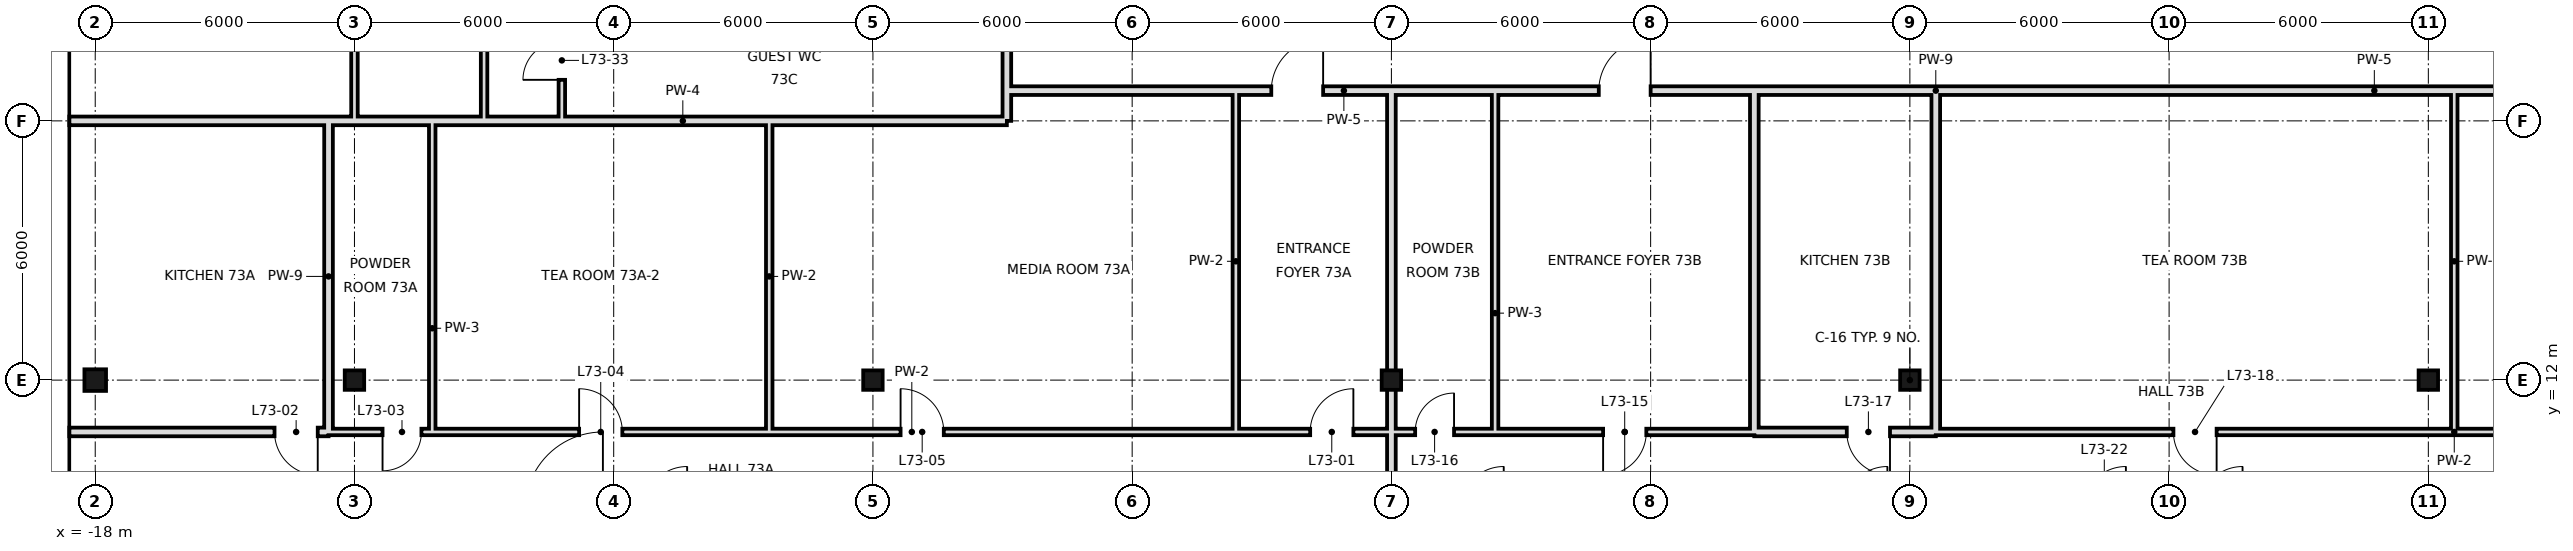
"""IFC4 building model, lengths in metres.
Left out: names, types, materials, properties, quantities, classifications, styles, units other than length and angle.
Written with IfcOpenShell. Run it as: python <this file> out.ifc"""

import sys

from ifc_helpers import new_model, si_unit, direction, frame, frame_2d, origin, origin_2d, place, context, subcontext, project, spatial, rectangle, hollow_rectangle, extrude, element, fill, save


model = new_model("IFC4")
c1 = context("Model", 3, precision=1e-05, world=origin(), true_north=direction((0.0, 1.0)))
c2 = subcontext(c1, "Body", "Model", "MODEL_VIEW")
j1 = project(units=[si_unit("LENGTHUNIT", "METRE"), si_unit("PLANEANGLEUNIT", "RADIAN")], contexts=[c1])
p1 = place(None, origin())
s1 = spatial("IfcSite", under=j1, at=p1, CompositionType="ELEMENT")
p2 = place(p1, origin())
s2 = spatial("IfcBuilding", under=s1, at=p2, CompositionType="ELEMENT")
p3 = place(p2, frame((0.0, 0.0, 308.8)))
s3 = spatial("IfcBuildingStorey", under=s2, at=p3, CompositionType="ELEMENT", Elevation=308.8)
p4 = place(p3, frame((-18.0, 12.0, 0.0), z_axis=(0.0, 0.0, 1.0), x_axis=(1.0, 0.0, 0.0)))
e1 = element("IfcColumn", 1, at=p4, inside=s3, PredefinedType="COLUMN", context=c2, shape_type="SweptSolid", body=[
    extrude(hollow_rectangle(XDim=0.5, YDim=0.5, WallThickness=0.025, at=origin_2d()), origin(), (0.0, 0.0, 1.0), 3.6),
])
for number, where, z_axis, x_axis in (
    (2, (-12.0, 12.0, 0.0), (0.0, 0.0, 1.0), (1.0, 0.0, 0.0)),
    (3, (0.0, 12.0, 0.0), (0.0, 0.0, 1.0), (1.0, 0.0, 0.0)),
    (4, (12.0, 12.0, 0.0), (0.0, 0.0, 1.0), (1.0, 0.0, 0.0)),
    (5, (24.0, 12.0, 0.0), (0.0, 0.0, 1.0), (1.0, 0.0, 0.0)),
    (6, (36.0, 12.0, 0.0), (0.0, 0.0, 1.0), (1.0, 0.0, 0.0)),
):
    element("IfcColumn", number, at=place(p3, frame(where, z_axis=z_axis, x_axis=x_axis)), inside=s3, PredefinedType="COLUMN", context=c2, shape_type="SweptSolid", body=[
        extrude(hollow_rectangle(XDim=0.45, YDim=0.45, WallThickness=0.022, at=origin_2d()), origin(), (0.0, 0.0, 1.0), 3.6),
    ])
p5 = place(p3, frame((-10.2, 10.8, 0.0), z_axis=(0.0, 0.0, 1.0), x_axis=(0.0, 1.0, 0.0)))
e7 = element("IfcWall", 7, at=p5, inside=s3, PredefinedType="PARTITIONING", context=c2, shape_type="SweptSolid", body=[
    extrude(rectangle(XDim=7.2, YDim=0.15, at=frame_2d((3.6, 0.0))), origin(), (0.0, 0.0, 1.0), 3.42),
])
p6 = place(p3, frame((-12.0, 18.0, 0.0), z_axis=(0.0, 0.0, 1.0), x_axis=(0.0, 1.0, 0.0)))
e8 = element("IfcWall", 8, at=p6, inside=s3, PredefinedType="PARTITIONING", context=c2, shape_type="SweptSolid", body=[
    extrude(rectangle(XDim=12.0, YDim=0.15, at=frame_2d((6.0, 0.0))), origin(), (0.0, 0.0, 1.0), 2.72),
])
p7 = place(p6, frame((3.16, 0.0, 0.0)))
e9 = element("IfcOpeningElement", 9, at=p7, cuts=e8, PredefinedType="OPENING", context=c2, shape_type="SweptSolid", body=[
    extrude(rectangle(XDim=1.8, YDim=2.4, at=frame_2d((0.9, 1.2))), frame((0.0, 0.085, 0.0), z_axis=(0.0, -1.0, 0.0), x_axis=(1.0, 0.0, 0.0)), (0.0, 0.0, 1.0), 0.17),
])
p8 = place(p3, frame((-12.6, 10.8, 0.0), z_axis=(0.0, 0.0, 1.0), x_axis=(0.0, 1.0, 0.0)))
e10 = element("IfcWall", 10, at=p8, inside=s3, PredefinedType="SOLIDWALL", context=c2, shape_type="SweptSolid", body=[
    extrude(rectangle(XDim=7.2, YDim=0.2, at=frame_2d((3.6, 0.0))), origin(), (0.0, 0.0, 1.0), 2.97),
])
p9 = place(p3, frame((-2.4, 10.8, 0.0), z_axis=(0.0, 0.0, 1.0), x_axis=(0.0, 1.0, 0.0)))
e11 = element("IfcWall", 11, at=p9, inside=s3, PredefinedType="PARTITIONING", context=c2, shape_type="SweptSolid", body=[
    extrude(rectangle(XDim=7.2, YDim=0.15, at=frame_2d((3.6, 0.0))), origin(), (0.0, 0.0, 1.0), 3.42),
])
p10 = place(p3, frame((-7.2, 18.0, 0.0), z_axis=(0.0, 0.0, 1.0), x_axis=(0.0, 1.0, 0.0)))
e12 = element("IfcWall", 12, at=p10, inside=s3, PredefinedType="PARTITIONING", context=c2, shape_type="SweptSolid", body=[
    extrude(rectangle(XDim=2.4, YDim=0.15, at=frame_2d((1.2, 0.0))), origin(), (0.0, 0.0, 1.0), 3.42),
])
p11 = place(p10, frame((0.95, 0.0, 0.0)))
e13 = element("IfcOpeningElement", 13, at=p11, cuts=e12, PredefinedType="OPENING", context=c2, shape_type="SweptSolid", body=[
    extrude(rectangle(XDim=0.9, YDim=2.4, at=frame_2d((0.45, 1.2))), frame((0.0, 0.085, 0.0), z_axis=(0.0, -1.0, 0.0), x_axis=(1.0, 0.0, 0.0)), (0.0, 0.0, 1.0), 0.17),
])
p12 = place(p3, frame((-9.0, 18.0, 0.0), z_axis=(0.0, 0.0, 1.0), x_axis=(0.0, 1.0, 0.0)))
e14 = element("IfcWall", 14, at=p12, inside=s3, PredefinedType="PARTITIONING", context=c2, shape_type="SweptSolid", body=[
    extrude(rectangle(XDim=18.0, YDim=0.15, at=frame_2d((9.0, 0.0))), origin(), (0.0, 0.0, 1.0), 3.42),
])
p13 = place(p12, frame((3.16, 0.0, 0.0)))
e15 = element("IfcOpeningElement", 15, at=p13, cuts=e14, PredefinedType="OPENING", context=c2, shape_type="SweptSolid", body=[
    extrude(rectangle(XDim=1.8, YDim=2.4, at=frame_2d((0.9, 1.2))), frame((0.0, 0.085, 0.0), z_axis=(0.0, -1.0, 0.0), x_axis=(1.0, 0.0, 0.0)), (0.0, 0.0, 1.0), 0.17),
])
p14 = place(p12, frame((13.6, 0.0, 0.0)))
e16 = element("IfcOpeningElement", 16, at=p14, cuts=e14, PredefinedType="OPENING", context=c2, shape_type="SweptSolid", body=[
    extrude(rectangle(XDim=1.0, YDim=2.4, at=frame_2d((0.5, 1.2))), frame((0.0, 0.085, 0.0), z_axis=(0.0, -1.0, 0.0), x_axis=(1.0, 0.0, 0.0)), (0.0, 0.0, 1.0), 0.17),
])
p15 = place(p3, frame((12.0, 0.0, 0.0), z_axis=(0.0, 0.0, 1.0), x_axis=(0.0, 1.0, 0.0)))
e17 = element("IfcWall", 17, at=p15, inside=s3, PredefinedType="SOLIDWALL", context=c2, shape_type="SweptSolid", body=[
    extrude(rectangle(XDim=18.7, YDim=0.2, at=frame_2d((9.35, 0.0))), origin(), (0.0, 0.0, 1.0), 2.72),
])
p16 = place(p3, frame((14.4, 10.8, 0.0), z_axis=(0.0, 0.0, 1.0), x_axis=(0.0, 1.0, 0.0)))
e18 = element("IfcWall", 18, at=p16, inside=s3, PredefinedType="PARTITIONING", context=c2, shape_type="SweptSolid", body=[
    extrude(rectangle(XDim=7.9, YDim=0.15, at=frame_2d((3.95, 0.0))), origin(), (0.0, 0.0, 1.0), 3.42),
])
for number, where, z_axis, x_axis in (
    (19, (20.4, 10.8, 0.0), (0.0, 0.0, 1.0), (0.0, 1.0, 0.0)),
    (20, (24.6, 10.8, 0.0), (0.0, 0.0, 1.0), (0.0, 1.0, 0.0)),
):
    element("IfcWall", number, at=place(p3, frame(where, z_axis=z_axis, x_axis=x_axis)), inside=s3, PredefinedType="SOLIDWALL", context=c2, shape_type="SweptSolid", body=[
        extrude(rectangle(XDim=7.9, YDim=0.2, at=frame_2d((3.95, 0.0))), origin(), (0.0, 0.0, 1.0), 2.72),
    ])
p17 = place(p3, frame((3.1, 18.7, 0.0), z_axis=(0.0, 0.0, 1.0), x_axis=(0.0, 1.0, 0.0)))
e21 = element("IfcWall", 21, at=p17, inside=s3, PredefinedType="SOLIDWALL", context=c2, shape_type="SweptSolid", body=[
    extrude(rectangle(XDim=1.7, YDim=0.2, at=frame_2d((0.85, 0.0))), origin(), (0.0, 0.0, 1.0), 3.42),
])
p18 = place(p3, frame((3.1, 18.0, 0.0), z_axis=(0.0, 0.0, 1.0), x_axis=(0.0, 1.0, 0.0)))
e22 = element("IfcWall", 22, at=p18, inside=s3, PredefinedType="SOLIDWALL", context=c2, shape_type="SweptSolid", body=[
    extrude(rectangle(XDim=0.7, YDim=0.2, at=frame_2d((0.35, 0.0))), origin(), (0.0, 0.0, 1.0), 2.97),
])
for number, where, z_axis, x_axis in (
    (23, (36.6, 10.8, 0.0), (0.0, 0.0, 1.0), (0.0, 1.0, 0.0)),
    (24, (8.4, 10.8, 0.0), (0.0, 0.0, 1.0), (0.0, 1.0, 0.0)),
):
    element("IfcWall", number, at=place(p3, frame(where, z_axis=z_axis, x_axis=x_axis)), inside=s3, PredefinedType="PARTITIONING", context=c2, shape_type="SweptSolid", body=[
        extrude(rectangle(XDim=7.9, YDim=0.15, at=frame_2d((3.95, 0.0))), origin(), (0.0, 0.0, 1.0), 3.42),
    ])
p19 = place(p3, frame((-18.6, 10.8, 0.0), z_axis=(0.0, 0.0, 1.0), x_axis=(1.0, 0.0, 0.0)))
e25 = element("IfcWall", 25, at=p19, inside=s3, PredefinedType="SOLIDWALL", context=c2, shape_type="SweptSolid", body=[
    extrude(rectangle(XDim=6.0, YDim=0.2, at=frame_2d((3.0, 0.0))), origin(), (0.0, 0.0, 1.0), 2.97),
])
p20 = place(p19, frame((4.75, 0.0, 0.0)))
e26 = element("IfcOpeningElement", 26, at=p20, cuts=e25, PredefinedType="OPENING", context=c2, shape_type="SweptSolid", body=[
    extrude(rectangle(XDim=1.0, YDim=2.4, at=frame_2d((0.5, 1.2))), frame((0.0, 0.11, 0.0), z_axis=(0.0, -1.0, 0.0), x_axis=(1.0, 0.0, 0.0)), (0.0, 0.0, 1.0), 0.22),
])
p21 = place(p3, frame((20.4, 10.8, 0.0), z_axis=(0.0, 0.0, 1.0), x_axis=(1.0, 0.0, 0.0)))
e27 = element("IfcWall", 27, at=p21, inside=s3, PredefinedType="SOLIDWALL", context=c2, shape_type="SweptSolid", body=[
    extrude(rectangle(XDim=4.2, YDim=0.2, at=frame_2d((2.1, 0.0))), origin(), (0.0, 0.0, 1.0), 2.72),
])
p22 = place(p21, frame((2.14, 0.0, 0.0)))
e28 = element("IfcOpeningElement", 28, at=p22, cuts=e27, PredefinedType="OPENING", context=c2, shape_type="SweptSolid", body=[
    extrude(rectangle(XDim=1.0, YDim=2.4, at=frame_2d((0.5, 1.2))), frame((0.0, 0.11, 0.0), z_axis=(0.0, -1.0, 0.0), x_axis=(1.0, 0.0, 0.0)), (0.0, 0.0, 1.0), 0.22),
])
p23 = place(p3, frame((-10.2, 10.8, 0.0), z_axis=(0.0, 0.0, 1.0), x_axis=(1.0, 0.0, 0.0)))
e29 = element("IfcWall", 29, at=p23, inside=s3, PredefinedType="PARTITIONING", context=c2, shape_type="SweptSolid", body=[
    extrude(rectangle(XDim=22.2, YDim=0.15, at=frame_2d((11.1, 0.0))), origin(), (0.0, 0.0, 1.0), 3.42),
])
p24 = place(p23, frame((20.32, 0.0, 0.0)))
e30 = element("IfcOpeningElement", 30, at=p24, cuts=e29, PredefinedType="OPENING", context=c2, shape_type="SweptSolid", body=[
    extrude(rectangle(XDim=1.0, YDim=2.4, at=frame_2d((0.5, 1.2))), frame((0.0, 0.085, 0.0), z_axis=(0.0, -1.0, 0.0), x_axis=(1.0, 0.0, 0.0)), (0.0, 0.0, 1.0), 0.17),
])
p25 = place(p23, frame((3.4, 0.0, 0.0)))
e31 = element("IfcOpeningElement", 31, at=p25, cuts=e29, PredefinedType="OPENING", context=c2, shape_type="SweptSolid", body=[
    extrude(rectangle(XDim=1.0, YDim=2.4, at=frame_2d((0.5, 1.2))), frame((0.0, 0.085, 0.0), z_axis=(0.0, -1.0, 0.0), x_axis=(1.0, 0.0, 0.0)), (0.0, 0.0, 1.0), 0.17),
])
p26 = place(p23, frame((10.84, 0.0, 0.0)))
e32 = element("IfcOpeningElement", 32, at=p26, cuts=e29, PredefinedType="OPENING", context=c2, shape_type="SweptSolid", body=[
    extrude(rectangle(XDim=1.0, YDim=2.4, at=frame_2d((0.5, 1.2))), frame((0.0, 0.085, 0.0), z_axis=(0.0, -1.0, 0.0), x_axis=(1.0, 0.0, 0.0)), (0.0, 0.0, 1.0), 0.17),
])
p27 = place(p3, frame((14.4, 10.8, 0.0), z_axis=(0.0, 0.0, 1.0), x_axis=(1.0, 0.0, 0.0)))
e33 = element("IfcWall", 33, at=p27, inside=s3, PredefinedType="PARTITIONING", context=c2, shape_type="SweptSolid", body=[
    extrude(rectangle(XDim=6.0, YDim=0.15, at=frame_2d((3.0, 0.0))), origin(), (0.0, 0.0, 1.0), 3.42),
])
p28 = place(p27, frame((2.5, 0.0, 0.0)))
e34 = element("IfcOpeningElement", 34, at=p28, cuts=e33, PredefinedType="OPENING", context=c2, shape_type="SweptSolid", body=[
    extrude(rectangle(XDim=1.0, YDim=2.4, at=frame_2d((0.5, 1.2))), frame((0.0, 0.085, 0.0), z_axis=(0.0, -1.0, 0.0), x_axis=(1.0, 0.0, 0.0)), (0.0, 0.0, 1.0), 0.17),
])
p29 = place(p3, frame((24.6, 10.8, 0.0), z_axis=(0.0, 0.0, 1.0), x_axis=(1.0, 0.0, 0.0)))
e35 = element("IfcWall", 35, at=p29, inside=s3, PredefinedType="PARTITIONING", context=c2, shape_type="SweptSolid", body=[
    extrude(rectangle(XDim=24.0, YDim=0.15, at=frame_2d((12.0, 0.0))), origin(), (0.0, 0.0, 1.0), 3.42),
])
p30 = place(p29, frame((5.5, 0.0, 0.0)))
e36 = element("IfcOpeningElement", 36, at=p30, cuts=e35, PredefinedType="OPENING", context=c2, shape_type="SweptSolid", body=[
    extrude(rectangle(XDim=1.0, YDim=2.4, at=frame_2d((0.5, 1.2))), frame((0.0, 0.085, 0.0), z_axis=(0.0, -1.0, 0.0), x_axis=(1.0, 0.0, 0.0)), (0.0, 0.0, 1.0), 0.17),
])
p31 = place(p29, frame((15.22, 0.0, 0.0)))
e37 = element("IfcOpeningElement", 37, at=p31, cuts=e35, PredefinedType="OPENING", context=c2, shape_type="SweptSolid", body=[
    extrude(rectangle(XDim=1.0, YDim=2.4, at=frame_2d((0.5, 1.2))), frame((0.0, 0.085, 0.0), z_axis=(0.0, -1.0, 0.0), x_axis=(1.0, 0.0, 0.0)), (0.0, 0.0, 1.0), 0.17),
])
p32 = place(p3, frame((-12.6, 10.8, 0.0), z_axis=(0.0, 0.0, 1.0), x_axis=(1.0, 0.0, 0.0)))
e38 = element("IfcWall", 38, at=p32, inside=s3, PredefinedType="PARTITIONING", context=c2, shape_type="SweptSolid", body=[
    extrude(rectangle(XDim=2.4, YDim=0.15, at=frame_2d((1.2, 0.0))), origin(), (0.0, 0.0, 1.0), 3.42),
])
p33 = place(p32, frame((1.25, 0.0, 0.0)))
e39 = element("IfcOpeningElement", 39, at=p33, cuts=e38, PredefinedType="OPENING", context=c2, shape_type="SweptSolid", body=[
    extrude(rectangle(XDim=0.9, YDim=2.4, at=frame_2d((0.45, 1.2))), frame((0.0, 0.085, 0.0), z_axis=(0.0, -1.0, 0.0), x_axis=(1.0, 0.0, 0.0)), (0.0, 0.0, 1.0), 0.17),
])
p34 = place(p3, frame((12.0, 10.8, 0.0), z_axis=(0.0, 0.0, 1.0), x_axis=(1.0, 0.0, 0.0)))
e40 = element("IfcWall", 40, at=p34, inside=s3, PredefinedType="PARTITIONING", context=c2, shape_type="SweptSolid", body=[
    extrude(rectangle(XDim=2.4, YDim=0.15, at=frame_2d((1.2, 0.0))), origin(), (0.0, 0.0, 1.0), 3.42),
])
p35 = place(p34, frame((0.55, 0.0, 0.0)))
e41 = element("IfcOpeningElement", 41, at=p35, cuts=e40, PredefinedType="OPENING", context=c2, shape_type="SweptSolid", body=[
    extrude(rectangle(XDim=0.9, YDim=2.4, at=frame_2d((0.45, 1.2))), frame((0.0, 0.085, 0.0), z_axis=(0.0, -1.0, 0.0), x_axis=(1.0, 0.0, 0.0)), (0.0, 0.0, 1.0), 0.17),
])
p36 = place(p3, frame((-18.6, 18.0, 0.0), z_axis=(0.0, 0.0, 1.0), x_axis=(1.0, 0.0, 0.0)))
e42 = element("IfcWall", 42, at=p36, inside=s3, PredefinedType="SOLIDWALL", context=c2, shape_type="SweptSolid", body=[
    extrude(rectangle(XDim=6.0, YDim=0.2, at=frame_2d((3.0, 0.0))), origin(), (0.0, 0.0, 1.0), 2.72),
])
p37 = place(p3, frame((-12.6, 18.0, 0.0), z_axis=(0.0, 0.0, 1.0), x_axis=(1.0, 0.0, 0.0)))
e43 = element("IfcWall", 43, at=p37, inside=s3, PredefinedType="SOLIDWALL", context=c2, shape_type="SweptSolid", body=[
    extrude(rectangle(XDim=15.7, YDim=0.2, at=frame_2d((7.85, 0.0))), origin(), (0.0, 0.0, 1.0), 2.72),
])
p38 = place(p3, frame((3.1, 18.7, 0.0), z_axis=(0.0, 0.0, 1.0), x_axis=(1.0, 0.0, 0.0)))
e44 = element("IfcWall", 44, at=p38, inside=s3, PredefinedType="SOLIDWALL", context=c2, shape_type="SweptSolid", body=[
    extrude(rectangle(XDim=17.3, YDim=0.2, at=frame_2d((8.65, 0.0))), origin(), (0.0, 0.0, 1.0), 2.72),
])
p39 = place(p38, frame((6.12, 0.0, 0.0)))
e45 = element("IfcOpeningElement", 45, at=p39, cuts=e44, PredefinedType="OPENING", context=c2, shape_type="SweptSolid", body=[
    extrude(rectangle(XDim=1.2, YDim=2.4, at=frame_2d((0.6, 1.2))), frame((0.0, 0.11, 0.0), z_axis=(0.0, -1.0, 0.0), x_axis=(1.0, 0.0, 0.0)), (0.0, 0.0, 1.0), 0.22),
])
p40 = place(p38, frame((13.7, 0.0, 0.0)))
e46 = element("IfcOpeningElement", 46, at=p40, cuts=e44, PredefinedType="OPENING", context=c2, shape_type="SweptSolid", body=[
    extrude(rectangle(XDim=1.2, YDim=2.4, at=frame_2d((0.6, 1.2))), frame((0.0, 0.11, 0.0), z_axis=(0.0, -1.0, 0.0), x_axis=(1.0, 0.0, 0.0)), (0.0, 0.0, 1.0), 0.22),
])
p41 = place(p3, frame((24.6, 18.7, 0.0), z_axis=(0.0, 0.0, 1.0), x_axis=(1.0, 0.0, 0.0)))
e47 = element("IfcWall", 47, at=p41, inside=s3, PredefinedType="SOLIDWALL", context=c2, shape_type="SweptSolid", body=[
    extrude(rectangle(XDim=20.3, YDim=0.2, at=frame_2d((10.15, 0.0))), origin(), (0.0, 0.0, 1.0), 2.72),
])
p42 = place(p3, frame((20.4, 18.7, 0.0), z_axis=(0.0, 0.0, 1.0), x_axis=(1.0, 0.0, 0.0)))
e48 = element("IfcWall", 48, at=p42, inside=s3, PredefinedType="SOLIDWALL", context=c2, shape_type="SweptSolid", body=[
    extrude(rectangle(XDim=4.2, YDim=0.2, at=frame_2d((2.1, 0.0))), origin(), (0.0, 0.0, 1.0), 3.42),
])
p43 = place(p24, frame((1.0, 0.0, 0.0), z_axis=(0.0, 0.0, 1.0), x_axis=(-1.0, 0.0, 0.0)))
e49 = element("IfcDoor", 49, at=p43, inside=s3, OperationType="SINGLE_SWING_LEFT", PredefinedType="DOOR", context=c2, shape_type="SweptSolid", body=[
    extrude(rectangle(XDim=1.0, YDim=2.4, at=frame_2d((0.5, 1.2))), frame((0.0, 0.025, 0.0), z_axis=(0.0, -1.0, 0.0), x_axis=(1.0, 0.0, 0.0)), (0.0, 0.0, 1.0), 0.05),
])
fill(e30, e49)
p44 = place(p20, origin())
e50 = element("IfcDoor", 50, at=p44, inside=s3, OperationType="SINGLE_SWING_RIGHT", PredefinedType="DOOR", context=c2, shape_type="SweptSolid", body=[
    extrude(rectangle(XDim=1.0, YDim=2.4, at=frame_2d((0.5, 1.2))), frame((0.0, 0.025, 0.0), z_axis=(0.0, -1.0, 0.0), x_axis=(1.0, 0.0, 0.0)), (0.0, 0.0, 1.0), 0.05),
])
fill(e26, e50)
p45 = place(p33, frame((0.9, 0.0, 0.0), z_axis=(0.0, 0.0, 1.0), x_axis=(-1.0, 0.0, 0.0)))
e51 = element("IfcDoor", 51, at=p45, inside=s3, OperationType="SINGLE_SWING_RIGHT", PredefinedType="DOOR", context=c2, shape_type="SweptSolid", body=[
    extrude(rectangle(XDim=0.9, YDim=2.4, at=frame_2d((0.45, 1.2))), frame((0.0, 0.025, 0.0), z_axis=(0.0, -1.0, 0.0), x_axis=(1.0, 0.0, 0.0)), (0.0, 0.0, 1.0), 0.05),
])
fill(e39, e51)
p46 = place(p25, origin())
e52 = element("IfcDoor", 52, at=p46, inside=s3, OperationType="SINGLE_SWING_LEFT", PredefinedType="DOOR", context=c2, shape_type="SweptSolid", body=[
    extrude(rectangle(XDim=1.0, YDim=2.4, at=frame_2d((0.5, 1.2))), frame((0.0, 0.025, 0.0), z_axis=(0.0, -1.0, 0.0), x_axis=(1.0, 0.0, 0.0)), (0.0, 0.0, 1.0), 0.05),
])
fill(e31, e52)
p47 = place(p26, origin())
e53 = element("IfcDoor", 53, at=p47, inside=s3, OperationType="SINGLE_SWING_LEFT", PredefinedType="DOOR", context=c2, shape_type="SweptSolid", body=[
    extrude(rectangle(XDim=1.0, YDim=2.4, at=frame_2d((0.5, 1.2))), frame((0.0, 0.025, 0.0), z_axis=(0.0, -1.0, 0.0), x_axis=(1.0, 0.0, 0.0)), (0.0, 0.0, 1.0), 0.05),
])
fill(e32, e53)
p48 = place(p28, frame((1.0, 0.0, 0.0), z_axis=(0.0, 0.0, 1.0), x_axis=(-1.0, 0.0, 0.0)))
e54 = element("IfcDoor", 54, at=p48, inside=s3, OperationType="SINGLE_SWING_RIGHT", PredefinedType="DOOR", context=c2, shape_type="SweptSolid", body=[
    extrude(rectangle(XDim=1.0, YDim=2.4, at=frame_2d((0.5, 1.2))), frame((0.0, 0.025, 0.0), z_axis=(0.0, -1.0, 0.0), x_axis=(1.0, 0.0, 0.0)), (0.0, 0.0, 1.0), 0.05),
])
fill(e34, e54)
p49 = place(p35, frame((0.9, 0.0, 0.0), z_axis=(0.0, 0.0, 1.0), x_axis=(-1.0, 0.0, 0.0)))
e55 = element("IfcDoor", 55, at=p49, inside=s3, OperationType="SINGLE_SWING_LEFT", PredefinedType="DOOR", context=c2, shape_type="SweptSolid", body=[
    extrude(rectangle(XDim=0.9, YDim=2.4, at=frame_2d((0.45, 1.2))), frame((0.0, 0.025, 0.0), z_axis=(0.0, -1.0, 0.0), x_axis=(1.0, 0.0, 0.0)), (0.0, 0.0, 1.0), 0.05),
])
fill(e41, e55)
p50 = place(p22, origin())
e56 = element("IfcDoor", 56, at=p50, inside=s3, OperationType="SINGLE_SWING_RIGHT", PredefinedType="DOOR", context=c2, shape_type="SweptSolid", body=[
    extrude(rectangle(XDim=1.0, YDim=2.4, at=frame_2d((0.5, 1.2))), frame((0.0, 0.025, 0.0), z_axis=(0.0, -1.0, 0.0), x_axis=(1.0, 0.0, 0.0)), (0.0, 0.0, 1.0), 0.05),
])
fill(e28, e56)
p51 = place(p30, origin())
e57 = element("IfcDoor", 57, at=p51, inside=s3, OperationType="SINGLE_SWING_RIGHT", PredefinedType="DOOR", context=c2, shape_type="SweptSolid", body=[
    extrude(rectangle(XDim=1.0, YDim=2.4, at=frame_2d((0.5, 1.2))), frame((0.0, 0.025, 0.0), z_axis=(0.0, -1.0, 0.0), x_axis=(1.0, 0.0, 0.0)), (0.0, 0.0, 1.0), 0.05),
])
fill(e36, e57)
p52 = place(p11, origin())
e58 = element("IfcDoor", 58, at=p52, inside=s3, OperationType="SINGLE_SWING_LEFT", PredefinedType="DOOR", context=c2, shape_type="SweptSolid", body=[
    extrude(rectangle(XDim=0.9, YDim=2.4, at=frame_2d((0.45, 1.2))), frame((0.0, 0.025, 0.0), z_axis=(0.0, -1.0, 0.0), x_axis=(1.0, 0.0, 0.0)), (0.0, 0.0, 1.0), 0.05),
])
fill(e13, e58)
p53 = place(p39, frame((1.2, 0.0, 0.0), z_axis=(0.0, 0.0, 1.0), x_axis=(-1.0, 0.0, 0.0)))
e59 = element("IfcDoor", 59, at=p53, inside=s3, OperationType="SINGLE_SWING_LEFT", PredefinedType="DOOR", context=c2, shape_type="SweptSolid", body=[
    extrude(rectangle(XDim=1.2, YDim=2.4, at=frame_2d((0.6, 1.2))), frame((0.0, 0.025, 0.0), z_axis=(0.0, -1.0, 0.0), x_axis=(1.0, 0.0, 0.0)), (0.0, 0.0, 1.0), 0.05),
])
fill(e45, e59)
p54 = place(p40, frame((1.2, 0.0, 0.0), z_axis=(0.0, 0.0, 1.0), x_axis=(-1.0, 0.0, 0.0)))
e60 = element("IfcDoor", 60, at=p54, inside=s3, OperationType="SINGLE_SWING_LEFT", PredefinedType="DOOR", context=c2, shape_type="SweptSolid", body=[
    extrude(rectangle(XDim=1.2, YDim=2.4, at=frame_2d((0.6, 1.2))), frame((0.0, 0.025, 0.0), z_axis=(0.0, -1.0, 0.0), x_axis=(1.0, 0.0, 0.0)), (0.0, 0.0, 1.0), 0.05),
])
fill(e46, e60)
save(model, sys.argv[1])
